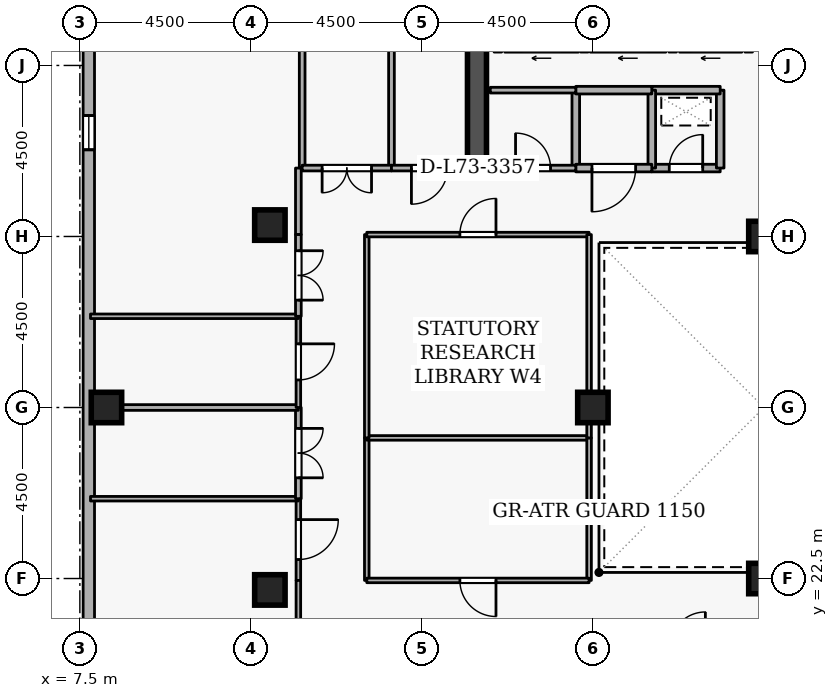
"""IFC4 building model, lengths in metres.
Left out: names, types, materials, properties, quantities, classifications, styles, units other than length and angle.
Written with IfcOpenShell. Run it as: python <this file> out.ifc"""

import sys

from ifc_helpers import new_model, si_unit, direction, frame, frame_2d, origin, origin_2d, place, context, subcontext, project, spatial, rectangle, extrude, element, fill, save


model = new_model("IFC4")
c1 = context("Model", 3, precision=1e-05, world=origin(), true_north=direction((0.0, 1.0)))
c2 = subcontext(c1, "Body", "Model", "MODEL_VIEW")
j1 = project(units=[si_unit("LENGTHUNIT", "METRE"), si_unit("PLANEANGLEUNIT", "RADIAN")], contexts=[c1])
p1 = place(None, origin())
s1 = spatial("IfcSite", under=j1, at=p1, CompositionType="ELEMENT")
p2 = place(p1, origin())
s2 = spatial("IfcBuilding", under=s1, at=p2, CompositionType="ELEMENT")
p3 = place(p2, frame((0.0, 0.0, 272.7)))
s3 = spatial("IfcBuildingStorey", under=s2, at=p3, CompositionType="ELEMENT", Elevation=272.7)
p4 = place(p3, frame((17.95, 33.1, 0.0), z_axis=(0.0, 0.0, 1.0), x_axis=(0.0, 1.0, 0.0)))
e1 = element("IfcWall", 1, at=p4, inside=s3, PredefinedType="SHEAR", context=c2, shape_type="SweptSolid", body=[
    extrude(rectangle(XDim=5.8, YDim=0.5, at=frame_2d((2.9, 0.0))), origin(), (0.0, 0.0, 1.0), 3.6),
])
for number, where, z_axis, x_axis in (
    (2, (8.2, 27.0, 0.0), (0.0, 0.0, 1.0), (1.0, 0.0, 0.0)),
    (3, (12.5, 22.2, 0.0), (0.0, 0.0, 1.0), (1.0, 0.0, 0.0)),
    (4, (12.5, 31.8, 0.0), (0.0, 0.0, 1.0), (1.0, 0.0, 0.0)),
    (5, (25.5, 22.5, 0.0), (0.0, 0.0, 1.0), (1.0, 0.0, 0.0)),
    (6, (25.5, 31.5, 0.0), (0.0, 0.0, 1.0), (1.0, 0.0, 0.0)),
    (7, (21.0, 27.0, 0.0), (0.0, 0.0, 1.0), (1.0, 0.0, 0.0)),
):
    element("IfcColumn", number, at=place(p3, frame(where, z_axis=z_axis, x_axis=x_axis)), inside=s3, PredefinedType="COLUMN", context=c2, shape_type="SweptSolid", body=[
        extrude(rectangle(XDim=0.8, YDim=0.8, at=origin_2d()), origin(), (0.0, 0.0, 1.0), 3.6),
    ])
p5 = place(p3, frame((7.735, 42.181, 0.0), z_axis=(0.0, 0.0, 1.0), x_axis=(2.7061402e-05, -0.999999999634, 0.0)))
e8 = element("IfcWall", 8, at=p5, inside=s3, PredefinedType="STANDARD", context=c2, shape_type="SweptSolid", body=[
    extrude(rectangle(XDim=36.087, YDim=0.3, at=frame_2d((18.043, 0.0))), origin(), (0.0, 0.0, 1.0), 2.7),
])
p6 = place(p5, frame((7.5, 0.0, 0.72)))
e9 = element("IfcOpeningElement", 9, at=p6, cuts=e8, PredefinedType="OPENING", context=c2, shape_type="SweptSolid", body=[
    extrude(rectangle(XDim=0.9, YDim=1.75, at=frame_2d((0.45, 0.875))), frame((0.0, 0.16, 0.0), z_axis=(0.0, -1.0, 0.0), x_axis=(1.0, 0.0, 0.0)), (0.0, 0.0, 1.0), 0.32),
])
p7 = place(p5, frame((21.9, 0.0, 0.72)))
e10 = element("IfcOpeningElement", 10, at=p7, cuts=e8, PredefinedType="OPENING", context=c2, shape_type="SweptSolid", body=[
    extrude(rectangle(XDim=0.9, YDim=1.75, at=frame_2d((0.45, 0.875))), frame((0.0, 0.16, 0.0), z_axis=(0.0, -1.0, 0.0), x_axis=(1.0, 0.0, 0.0)), (0.0, 0.0, 1.0), 0.32),
])
p8 = place(p5, frame((31.5, 0.0, 0.72)))
e11 = element("IfcOpeningElement", 11, at=p8, cuts=e8, PredefinedType="OPENING", context=c2, shape_type="SweptSolid", body=[
    extrude(rectangle(XDim=0.9, YDim=1.75, at=frame_2d((0.45, 0.875))), frame((0.0, 0.16, 0.0), z_axis=(0.0, -1.0, 0.0), x_axis=(1.0, 0.0, 0.0)), (0.0, 0.0, 1.0), 0.32),
])
p9 = place(p3, frame((24.92, 36.45, 0.0), z_axis=(0.0, 0.0, 1.0), x_axis=(-1.0, 0.0, 0.0)))
e12 = element("IfcWall", 12, at=p9, inside=s3, PredefinedType="STANDARD", context=c2, shape_type="SweptSolid", body=[
    extrude(rectangle(XDim=1.64, YDim=0.2, at=frame_2d((0.82, 0.0))), origin(), (0.0, 0.0, 1.0), 3.34),
])
p10 = place(p9, frame((0.31, 0.0, 0.0)))
e13 = element("IfcOpeningElement", 13, at=p10, cuts=e12, PredefinedType="OPENING", context=c2, shape_type="SweptSolid", body=[
    extrude(rectangle(XDim=1.02, YDim=2.06, at=frame_2d((0.51, 1.03))), frame((0.0, 0.11, 0.0), z_axis=(0.0, -1.0, 0.0), x_axis=(1.0, 0.0, 0.0)), (0.0, 0.0, 1.0), 0.22),
])
p11 = place(p3, frame((22.92, 36.45, 0.0), z_axis=(0.0, 0.0, 1.0), x_axis=(-1.0, 0.0, 0.0)))
e14 = element("IfcWall", 14, at=p11, inside=s3, PredefinedType="STANDARD", context=c2, shape_type="SweptSolid", body=[
    extrude(rectangle(XDim=1.99, YDim=0.2, at=frame_2d((0.995, 0.0))), origin(), (0.0, 0.0, 1.0), 3.34),
])
p12 = place(p11, frame((0.485, 0.0, 0.0)))
e15 = element("IfcOpeningElement", 15, at=p12, cuts=e14, PredefinedType="OPENING", context=c2, shape_type="SweptSolid", body=[
    extrude(rectangle(XDim=1.02, YDim=2.06, at=frame_2d((0.51, 1.03))), frame((0.0, 0.11, 0.0), z_axis=(0.0, -1.0, 0.0), x_axis=(1.0, 0.0, 0.0)), (0.0, 0.0, 1.0), 0.22),
])
p13 = place(p3, frame((20.62, 36.45, 0.0), z_axis=(0.0, 0.0, 1.0), x_axis=(-1.0, 0.0, 0.0)))
e16 = element("IfcWall", 16, at=p13, inside=s3, PredefinedType="STANDARD", context=c2, shape_type="SweptSolid", body=[
    extrude(rectangle(XDim=1.94, YDim=0.2, at=frame_2d((0.97, 0.0))), origin(), (0.0, 0.0, 1.0), 3.34),
])
p14 = place(p13, frame((0.46, 0.0, 0.0)))
e17 = element("IfcOpeningElement", 17, at=p14, cuts=e16, PredefinedType="OPENING", context=c2, shape_type="SweptSolid", body=[
    extrude(rectangle(XDim=1.02, YDim=2.06, at=frame_2d((0.51, 1.03))), frame((0.0, 0.11, 0.0), z_axis=(0.0, -1.0, 0.0), x_axis=(1.0, 0.0, 0.0)), (0.0, 0.0, 1.0), 0.22),
])
p15 = place(p3, frame((22.55, 33.3, 0.0), z_axis=(0.0, 0.0, 1.0), x_axis=(1.0, 0.0, 0.0)))
e18 = element("IfcWall", 18, at=p15, inside=s3, PredefinedType="STANDARD", context=c2, shape_type="SweptSolid", body=[
    extrude(rectangle(XDim=1.8, YDim=0.2, at=frame_2d((0.9, 0.0))), origin(), (0.0, 0.0, 1.0), 3.34),
])
p16 = place(p15, frame((0.46, 0.0, 0.0)))
e19 = element("IfcOpeningElement", 19, at=p16, cuts=e18, PredefinedType="OPENING", context=c2, shape_type="SweptSolid", body=[
    extrude(rectangle(XDim=0.88, YDim=2.04, at=frame_2d((0.44, 1.02))), frame((0.0, 0.11, 0.0), z_axis=(0.0, -1.0, 0.0), x_axis=(1.0, 0.0, 0.0)), (0.0, 0.0, 1.0), 0.22),
])
p17 = place(p3, frame((24.35, 33.3, 0.0), z_axis=(0.0, 0.0, 1.0), x_axis=(0.0, 1.0, 0.0)))
e20 = element("IfcWall", 20, at=p17, inside=s3, PredefinedType="STANDARD", context=c2, shape_type="SweptSolid", body=[
    extrude(rectangle(XDim=2.05, YDim=0.2, at=frame_2d((1.025, 0.0))), origin(), (0.0, 0.0, 1.0), 3.34),
])
p18 = place(p3, frame((24.35, 35.35, 0.0), z_axis=(0.0, 0.0, 1.0), x_axis=(-1.0, 0.0, 0.0)))
e21 = element("IfcWall", 21, at=p18, inside=s3, PredefinedType="STANDARD", context=c2, shape_type="SweptSolid", body=[
    extrude(rectangle(XDim=1.8, YDim=0.2, at=frame_2d((0.9, 0.0))), origin(), (0.0, 0.0, 1.0), 3.34),
])
for number, where, z_axis, x_axis in (
    (22, (22.55, 35.35, 0.0), (0.0, 0.0, 1.0), (0.0, -1.0, 0.0)),
    (23, (20.55, 33.3, 0.0), (0.0, 0.0, 1.0), (0.0, 1.0, 0.0)),
):
    element("IfcWall", number, at=place(p3, frame(where, z_axis=z_axis, x_axis=x_axis)), inside=s3, PredefinedType="STANDARD", context=c2, shape_type="SweptSolid", body=[
        extrude(rectangle(XDim=2.05, YDim=0.2, at=frame_2d((1.025, 0.0))), origin(), (0.0, 0.0, 1.0), 3.34),
    ])
p19 = place(p3, frame((20.55, 35.35, 0.0), z_axis=(0.0, 0.0, 1.0), x_axis=(1.0, 0.0, 0.0)))
e24 = element("IfcWall", 24, at=p19, inside=s3, PredefinedType="STANDARD", context=c2, shape_type="SweptSolid", body=[
    extrude(rectangle(XDim=2.0, YDim=0.2, at=frame_2d((1.0, 0.0))), origin(), (0.0, 0.0, 1.0), 3.34),
])
p20 = place(p3, frame((22.55, 33.3, 0.0), z_axis=(0.0, 0.0, 1.0), x_axis=(-1.0, 0.0, 0.0)))
e25 = element("IfcWall", 25, at=p20, inside=s3, PredefinedType="STANDARD", context=c2, shape_type="SweptSolid", body=[
    extrude(rectangle(XDim=2.0, YDim=0.2, at=frame_2d((1.0, 0.0))), origin(), (0.0, 0.0, 1.0), 3.34),
])
p21 = place(p20, frame((0.425, 0.0, 0.0)))
e26 = element("IfcOpeningElement", 26, at=p21, cuts=e25, PredefinedType="OPENING", context=c2, shape_type="SweptSolid", body=[
    extrude(rectangle(XDim=1.15, YDim=2.1, at=frame_2d((0.575, 1.05))), frame((0.0, 0.11, 0.0), z_axis=(0.0, -1.0, 0.0), x_axis=(1.0, 0.0, 0.0)), (0.0, 0.0, 1.0), 0.22),
])
p22 = place(p3, frame((18.3, 33.3, 0.0), z_axis=(0.0, 0.0, 1.0), x_axis=(1.0, 0.0, 0.0)))
e27 = element("IfcWall", 27, at=p22, inside=s3, PredefinedType="PARTITIONING", context=c2, shape_type="SweptSolid", body=[
    extrude(rectangle(XDim=2.25, YDim=0.15, at=frame_2d((1.125, 0.0))), origin(), (0.0, 0.0, 1.0), 3.34),
])
p23 = place(p22, frame((0.665, 0.0, 0.0)))
e28 = element("IfcOpeningElement", 28, at=p23, cuts=e27, PredefinedType="OPENING", context=c2, shape_type="SweptSolid", body=[
    extrude(rectangle(XDim=0.92, YDim=2.08, at=frame_2d((0.46, 1.04))), frame((0.0, 0.085, 0.0), z_axis=(0.0, -1.0, 0.0), x_axis=(1.0, 0.0, 0.0)), (0.0, 0.0, 1.0), 0.17),
])
p24 = place(p3, frame((20.55, 35.35, 0.0), z_axis=(0.0, 0.0, 1.0), x_axis=(-1.0, 0.0, 0.0)))
e29 = element("IfcWall", 29, at=p24, inside=s3, PredefinedType="PARTITIONING", context=c2, shape_type="SweptSolid", body=[
    extrude(rectangle(XDim=2.25, YDim=0.15, at=frame_2d((1.125, 0.0))), origin(), (0.0, 0.0, 1.0), 3.34),
])
for number, where, z_axis, x_axis in (
    (30, (13.35, 33.3, 0.0), (0.0, 0.0, 1.0), (0.0, 1.0, 0.0)),
    (31, (15.7, 44.72, 0.0), (0.0, 0.0, 1.0), (0.0, -1.0, 0.0)),
):
    element("IfcWall", number, at=place(p3, frame(where, z_axis=z_axis, x_axis=x_axis)), inside=s3, PredefinedType="PARTITIONING", context=c2, shape_type="SweptSolid", body=[
        extrude(rectangle(XDim=11.42, YDim=0.15, at=frame_2d((5.71, 0.0))), origin(), (0.0, 0.0, 1.0), 3.34),
    ])
p25 = place(p3, frame((15.7, 33.3, 0.0), z_axis=(0.0, 0.0, 1.0), x_axis=(-1.0, 0.0, 0.0)))
e32 = element("IfcWall", 32, at=p25, inside=s3, PredefinedType="PARTITIONING", context=c2, shape_type="SweptSolid", body=[
    extrude(rectangle(XDim=2.35, YDim=0.15, at=frame_2d((1.175, 0.0))), origin(), (0.0, 0.0, 1.0), 3.34),
])
p26 = place(p25, frame((0.525, 0.0, 0.0)))
e33 = element("IfcOpeningElement", 33, at=p26, cuts=e32, PredefinedType="OPENING", context=c2, shape_type="SweptSolid", body=[
    extrude(rectangle(XDim=1.3, YDim=2.12, at=frame_2d((0.65, 1.06))), frame((0.0, 0.085, 0.0), z_axis=(0.0, -1.0, 0.0), x_axis=(1.0, 0.0, 0.0)), (0.0, 0.0, 1.0), 0.17),
])
p27 = place(p3, frame((17.7, 33.3, 0.0), z_axis=(0.0, 0.0, 1.0), x_axis=(-1.0, 0.0, 0.0)))
e34 = element("IfcWall", 34, at=p27, inside=s3, PredefinedType="PARTITIONING", context=c2, shape_type="SweptSolid", body=[
    extrude(rectangle(XDim=2.0, YDim=0.15, at=frame_2d((1.0, 0.0))), origin(), (0.0, 0.0, 1.0), 3.34),
])
p28 = place(p27, frame((0.525, 0.0, 0.0)))
e35 = element("IfcOpeningElement", 35, at=p28, cuts=e34, PredefinedType="OPENING", context=c2, shape_type="SweptSolid", body=[
    extrude(rectangle(XDim=0.95, YDim=2.1, at=frame_2d((0.475, 1.05))), frame((0.0, 0.085, 0.0), z_axis=(0.0, -1.0, 0.0), x_axis=(1.0, 0.0, 0.0)), (0.0, 0.0, 1.0), 0.17),
])
p29 = place(p3, frame((13.25, 24.6, 0.0), z_axis=(0.0, 0.0, 1.0), x_axis=(0.0, -1.0, 0.0)))
e36 = element("IfcWall", 36, at=p29, inside=s3, PredefinedType="PARTITIONING", context=c2, shape_type="SweptSolid", body=[
    extrude(rectangle(XDim=2.15, YDim=0.12, at=frame_2d((1.075, 0.0))), origin(), (0.0, 0.0, 1.0), 3.34),
])
p30 = place(p29, frame((0.55, 0.0, 0.0)))
e37 = element("IfcOpeningElement", 37, at=p30, cuts=e36, PredefinedType="OPENING", context=c2, shape_type="SweptSolid", body=[
    extrude(rectangle(XDim=1.05, YDim=2.1, at=frame_2d((0.525, 1.05))), frame((0.0, 0.07, 0.0), z_axis=(0.0, -1.0, 0.0), x_axis=(1.0, 0.0, 0.0)), (0.0, 0.0, 1.0), 0.14),
])
p31 = place(p3, frame((13.25, 22.45, 0.0), z_axis=(0.0, 0.0, 1.0), x_axis=(0.0, -1.0, 0.0)))
e38 = element("IfcWall", 38, at=p31, inside=s3, PredefinedType="PARTITIONING", context=c2, shape_type="SweptSolid", body=[
    extrude(rectangle(XDim=1.75, YDim=0.12, at=frame_2d((0.875, 0.0))), origin(), (0.0, 0.0, 1.0), 3.34),
])
p32 = place(p3, frame((7.78, 24.6, 0.0), z_axis=(0.0, 0.0, 1.0), x_axis=(1.0, 0.0, 0.0)))
e39 = element("IfcWall", 39, at=p32, inside=s3, PredefinedType="PARTITIONING", context=c2, shape_type="SweptSolid", body=[
    extrude(rectangle(XDim=5.47, YDim=0.12, at=frame_2d((2.735, 0.0))), origin(), (0.0, 0.0, 1.0), 3.34),
])
p33 = place(p3, frame((13.25, 27.0, 0.0), z_axis=(0.0, 0.0, 1.0), x_axis=(0.0, -1.0, 0.0)))
e40 = element("IfcWall", 40, at=p33, inside=s3, PredefinedType="PARTITIONING", context=c2, shape_type="SweptSolid", body=[
    extrude(rectangle(XDim=2.4, YDim=0.15, at=frame_2d((1.2, 0.0))), origin(), (0.0, 0.0, 1.0), 3.34),
])
p34 = place(p33, frame((0.55, 0.0, 0.0)))
e41 = element("IfcOpeningElement", 41, at=p34, cuts=e40, PredefinedType="OPENING", context=c2, shape_type="SweptSolid", body=[
    extrude(rectangle(XDim=1.3, YDim=2.12, at=frame_2d((0.65, 1.06))), frame((0.0, 0.085, 0.0), z_axis=(0.0, -1.0, 0.0), x_axis=(1.0, 0.0, 0.0)), (0.0, 0.0, 1.0), 0.17),
])
p35 = place(p3, frame((7.78, 27.0, 0.0), z_axis=(0.0, 0.0, 1.0), x_axis=(1.0, 0.0, 0.0)))
e42 = element("IfcWall", 42, at=p35, inside=s3, PredefinedType="PARTITIONING", context=c2, shape_type="SweptSolid", body=[
    extrude(rectangle(XDim=5.47, YDim=0.15, at=frame_2d((2.735, 0.0))), origin(), (0.0, 0.0, 1.0), 2.882),
])
p36 = place(p3, frame((13.25, 29.4, 0.0), z_axis=(0.0, 0.0, 1.0), x_axis=(0.0, -1.0, 0.0)))
e43 = element("IfcWall", 43, at=p36, inside=s3, PredefinedType="PARTITIONING", context=c2, shape_type="SweptSolid", body=[
    extrude(rectangle(XDim=2.4, YDim=0.12, at=frame_2d((1.2, 0.0))), origin(), (0.0, 0.0, 1.0), 3.34),
])
p37 = place(p36, frame((0.725, 0.0, 0.0)))
e44 = element("IfcOpeningElement", 44, at=p37, cuts=e43, PredefinedType="OPENING", context=c2, shape_type="SweptSolid", body=[
    extrude(rectangle(XDim=0.95, YDim=2.1, at=frame_2d((0.475, 1.05))), frame((0.0, 0.07, 0.0), z_axis=(0.0, -1.0, 0.0), x_axis=(1.0, 0.0, 0.0)), (0.0, 0.0, 1.0), 0.14),
])
p38 = place(p3, frame((7.78, 29.4, 0.0), z_axis=(0.0, 0.0, 1.0), x_axis=(1.0, 0.0, 0.0)))
e45 = element("IfcWall", 45, at=p38, inside=s3, PredefinedType="PARTITIONING", context=c2, shape_type="SweptSolid", body=[
    extrude(rectangle(XDim=5.47, YDim=0.12, at=frame_2d((2.735, 0.0))), origin(), (0.0, 0.0, 1.0), 3.34),
])
p39 = place(p3, frame((13.25, 33.3, 0.0), z_axis=(0.0, 0.0, 1.0), x_axis=(0.0, -1.0, 0.0)))
e46 = element("IfcWall", 46, at=p39, inside=s3, PredefinedType="PARTITIONING", context=c2, shape_type="SweptSolid", body=[
    extrude(rectangle(XDim=1.75, YDim=0.15, at=frame_2d((0.875, 0.0))), origin(), (0.0, 0.0, 1.0), 3.34),
])
p40 = place(p3, frame((13.25, 31.55, 0.0), z_axis=(0.0, 0.0, 1.0), x_axis=(0.0, -1.0, 0.0)))
e47 = element("IfcWall", 47, at=p40, inside=s3, PredefinedType="PARTITIONING", context=c2, shape_type="SweptSolid", body=[
    extrude(rectangle(XDim=2.15, YDim=0.15, at=frame_2d((1.075, 0.0))), origin(), (0.0, 0.0, 1.0), 3.34),
])
p41 = place(p40, frame((0.425, 0.0, 0.0)))
e48 = element("IfcOpeningElement", 48, at=p41, cuts=e47, PredefinedType="OPENING", context=c2, shape_type="SweptSolid", body=[
    extrude(rectangle(XDim=1.3, YDim=2.12, at=frame_2d((0.65, 1.06))), frame((0.0, 0.085, 0.0), z_axis=(0.0, -1.0, 0.0), x_axis=(1.0, 0.0, 0.0)), (0.0, 0.0, 1.0), 0.17),
])
p42 = place(p3, frame((15.05, 22.45, 0.0), z_axis=(0.0, 0.0, 1.0), x_axis=(0.0, 1.0, 0.0)))
e49 = element("IfcWall", 49, at=p42, inside=s3, PredefinedType="PARTITIONING", context=c2, shape_type="SweptSolid", body=[
    extrude(rectangle(XDim=3.75, YDim=0.12, at=frame_2d((1.875, 0.0))), origin(), (0.0, 0.0, 1.0), 3.34),
])
p43 = place(p3, frame((15.05, 26.2, 0.0), z_axis=(0.0, 0.0, 1.0), x_axis=(1.0, 0.0, 0.0)))
e50 = element("IfcWall", 50, at=p43, inside=s3, PredefinedType="PARTITIONING", context=c2, shape_type="SweptSolid", body=[
    extrude(rectangle(XDim=5.85, YDim=0.12, at=frame_2d((2.925, 0.0))), origin(), (0.0, 0.0, 1.0), 3.34),
])
p44 = place(p3, frame((20.9, 26.2, 0.0), z_axis=(0.0, 0.0, 1.0), x_axis=(0.0, -1.0, 0.0)))
e51 = element("IfcWall", 51, at=p44, inside=s3, PredefinedType="PARTITIONING", context=c2, shape_type="SweptSolid", body=[
    extrude(rectangle(XDim=3.75, YDim=0.12, at=frame_2d((1.875, 0.0))), origin(), (0.0, 0.0, 1.0), 3.34),
])
p45 = place(p3, frame((20.9, 22.45, 0.0), z_axis=(0.0, 0.0, 1.0), x_axis=(-1.0, 0.0, 0.0)))
e52 = element("IfcWall", 52, at=p45, inside=s3, PredefinedType="PARTITIONING", context=c2, shape_type="SweptSolid", body=[
    extrude(rectangle(XDim=5.85, YDim=0.12, at=frame_2d((2.925, 0.0))), origin(), (0.0, 0.0, 1.0), 3.34),
])
p46 = place(p45, frame((2.45, 0.0, 0.0)))
e53 = element("IfcOpeningElement", 53, at=p46, cuts=e52, PredefinedType="OPENING", context=c2, shape_type="SweptSolid", body=[
    extrude(rectangle(XDim=0.95, YDim=2.1, at=frame_2d((0.475, 1.05))), frame((0.0, 0.07, 0.0), z_axis=(0.0, -1.0, 0.0), x_axis=(1.0, 0.0, 0.0)), (0.0, 0.0, 1.0), 0.14),
])
p47 = place(p3, frame((15.05, 26.2, 0.0), z_axis=(0.0, 0.0, 1.0), x_axis=(0.0, 1.0, 0.0)))
e54 = element("IfcWall", 54, at=p47, inside=s3, PredefinedType="PARTITIONING", context=c2, shape_type="SweptSolid", body=[
    extrude(rectangle(XDim=5.35, YDim=0.12, at=frame_2d((2.675, 0.0))), origin(), (0.0, 0.0, 1.0), 3.34),
])
p48 = place(p3, frame((15.05, 31.55, 0.0), z_axis=(0.0, 0.0, 1.0), x_axis=(1.0, 0.0, 0.0)))
e55 = element("IfcWall", 55, at=p48, inside=s3, PredefinedType="PARTITIONING", context=c2, shape_type="SweptSolid", body=[
    extrude(rectangle(XDim=5.85, YDim=0.12, at=frame_2d((2.925, 0.0))), origin(), (0.0, 0.0, 1.0), 3.34),
])
p49 = place(p48, frame((2.45, 0.0, 0.0)))
e56 = element("IfcOpeningElement", 56, at=p49, cuts=e55, PredefinedType="OPENING", context=c2, shape_type="SweptSolid", body=[
    extrude(rectangle(XDim=0.95, YDim=2.1, at=frame_2d((0.475, 1.05))), frame((0.0, 0.07, 0.0), z_axis=(0.0, -1.0, 0.0), x_axis=(1.0, 0.0, 0.0)), (0.0, 0.0, 1.0), 0.14),
])
p50 = place(p3, frame((20.9, 31.55, 0.0), z_axis=(0.0, 0.0, 1.0), x_axis=(0.0, -1.0, 0.0)))
e57 = element("IfcWall", 57, at=p50, inside=s3, PredefinedType="PARTITIONING", context=c2, shape_type="SweptSolid", body=[
    extrude(rectangle(XDim=5.35, YDim=0.12, at=frame_2d((2.675, 0.0))), origin(), (0.0, 0.0, 1.0), 3.34),
])
p51 = place(p6, origin())
e58 = element("IfcWindow", 58, at=p51, inside=s3, PartitioningType="SINGLE_PANEL", PredefinedType="WINDOW", context=c2, shape_type="SweptSolid", body=[
    extrude(rectangle(XDim=0.9, YDim=1.75, at=frame_2d((0.45, 0.875))), frame((0.0, 0.03, 0.0), z_axis=(0.0, -1.0, 0.0), x_axis=(1.0, 0.0, 0.0)), (0.0, 0.0, 1.0), 0.06),
])
fill(e9, e58)
p52 = place(p16, origin())
e59 = element("IfcDoor", 59, at=p52, inside=s3, OperationType="SINGLE_SWING_RIGHT", PredefinedType="DOOR", context=c2, shape_type="SweptSolid", body=[
    extrude(rectangle(XDim=0.88, YDim=2.04, at=frame_2d((0.44, 1.02))), frame((0.0, 0.025, 0.0), z_axis=(0.0, -1.0, 0.0), x_axis=(1.0, 0.0, 0.0)), (0.0, 0.0, 1.0), 0.05),
])
fill(e19, e59)
p53 = place(p23, origin())
e60 = element("IfcDoor", 60, at=p53, inside=s3, OperationType="SINGLE_SWING_LEFT", PredefinedType="DOOR", context=c2, shape_type="SweptSolid", body=[
    extrude(rectangle(XDim=0.92, YDim=2.08, at=frame_2d((0.46, 1.04))), frame((0.0, 0.025, 0.0), z_axis=(0.0, -1.0, 0.0), x_axis=(1.0, 0.0, 0.0)), (0.0, 0.0, 1.0), 0.05),
])
fill(e28, e60)
p54 = place(p21, origin())
e61 = element("IfcDoor", 61, at=p54, inside=s3, OperationType="SINGLE_SWING_RIGHT", PredefinedType="DOOR", context=c2, shape_type="SweptSolid", body=[
    extrude(rectangle(XDim=1.15, YDim=2.1, at=frame_2d((0.575, 1.05))), frame((0.0, 0.025, 0.0), z_axis=(0.0, -1.0, 0.0), x_axis=(1.0, 0.0, 0.0)), (0.0, 0.0, 1.0), 0.05),
])
fill(e26, e61)
p55 = place(p26, origin())
e62 = element("IfcDoor", 62, at=p55, inside=s3, OperationType="DOUBLE_DOOR_SINGLE_SWING", PredefinedType="DOOR", context=c2, shape_type="SweptSolid", body=[
    extrude(rectangle(XDim=1.3, YDim=2.12, at=frame_2d((0.65, 1.06))), frame((0.0, 0.025, 0.0), z_axis=(0.0, -1.0, 0.0), x_axis=(1.0, 0.0, 0.0)), (0.0, 0.0, 1.0), 0.05),
])
fill(e33, e62)
p56 = place(p28, origin())
e63 = element("IfcDoor", 63, at=p56, inside=s3, OperationType="SINGLE_SWING_RIGHT", PredefinedType="DOOR", context=c2, shape_type="SweptSolid", body=[
    extrude(rectangle(XDim=0.95, YDim=2.1, at=frame_2d((0.475, 1.05))), frame((0.0, 0.025, 0.0), z_axis=(0.0, -1.0, 0.0), x_axis=(1.0, 0.0, 0.0)), (0.0, 0.0, 1.0), 0.05),
])
fill(e35, e63)
p57 = place(p30, origin())
e64 = element("IfcDoor", 64, at=p57, inside=s3, OperationType="SINGLE_SWING_LEFT", PredefinedType="DOOR", context=c2, shape_type="SweptSolid", body=[
    extrude(rectangle(XDim=1.05, YDim=2.1, at=frame_2d((0.525, 1.05))), frame((0.0, 0.025, 0.0), z_axis=(0.0, -1.0, 0.0), x_axis=(1.0, 0.0, 0.0)), (0.0, 0.0, 1.0), 0.05),
])
fill(e37, e64)
p58 = place(p34, origin())
e65 = element("IfcDoor", 65, at=p58, inside=s3, OperationType="DOUBLE_DOOR_SINGLE_SWING", PredefinedType="DOOR", context=c2, shape_type="SweptSolid", body=[
    extrude(rectangle(XDim=1.3, YDim=2.12, at=frame_2d((0.65, 1.06))), frame((0.0, 0.025, 0.0), z_axis=(0.0, -1.0, 0.0), x_axis=(1.0, 0.0, 0.0)), (0.0, 0.0, 1.0), 0.05),
])
fill(e41, e65)
p59 = place(p37, origin())
e66 = element("IfcDoor", 66, at=p59, inside=s3, OperationType="SINGLE_SWING_LEFT", PredefinedType="DOOR", context=c2, shape_type="SweptSolid", body=[
    extrude(rectangle(XDim=0.95, YDim=2.1, at=frame_2d((0.475, 1.05))), frame((0.0, 0.025, 0.0), z_axis=(0.0, -1.0, 0.0), x_axis=(1.0, 0.0, 0.0)), (0.0, 0.0, 1.0), 0.05),
])
fill(e44, e66)
p60 = place(p41, origin())
e67 = element("IfcDoor", 67, at=p60, inside=s3, OperationType="DOUBLE_DOOR_SINGLE_SWING", PredefinedType="DOOR", context=c2, shape_type="SweptSolid", body=[
    extrude(rectangle(XDim=1.3, YDim=2.12, at=frame_2d((0.65, 1.06))), frame((0.0, 0.025, 0.0), z_axis=(0.0, -1.0, 0.0), x_axis=(1.0, 0.0, 0.0)), (0.0, 0.0, 1.0), 0.05),
])
fill(e48, e67)
p61 = place(p46, origin())
e68 = element("IfcDoor", 68, at=p61, inside=s3, OperationType="SINGLE_SWING_LEFT", PredefinedType="DOOR", context=c2, shape_type="SweptSolid", body=[
    extrude(rectangle(XDim=0.95, YDim=2.1, at=frame_2d((0.475, 1.05))), frame((0.0, 0.025, 0.0), z_axis=(0.0, -1.0, 0.0), x_axis=(1.0, 0.0, 0.0)), (0.0, 0.0, 1.0), 0.05),
])
fill(e53, e68)
p62 = place(p49, origin())
e69 = element("IfcDoor", 69, at=p62, inside=s3, OperationType="SINGLE_SWING_RIGHT", PredefinedType="DOOR", context=c2, shape_type="SweptSolid", body=[
    extrude(rectangle(XDim=0.95, YDim=2.1, at=frame_2d((0.475, 1.05))), frame((0.0, 0.025, 0.0), z_axis=(0.0, -1.0, 0.0), x_axis=(1.0, 0.0, 0.0)), (0.0, 0.0, 1.0), 0.05),
])
fill(e56, e69)
save(model, sys.argv[1])
